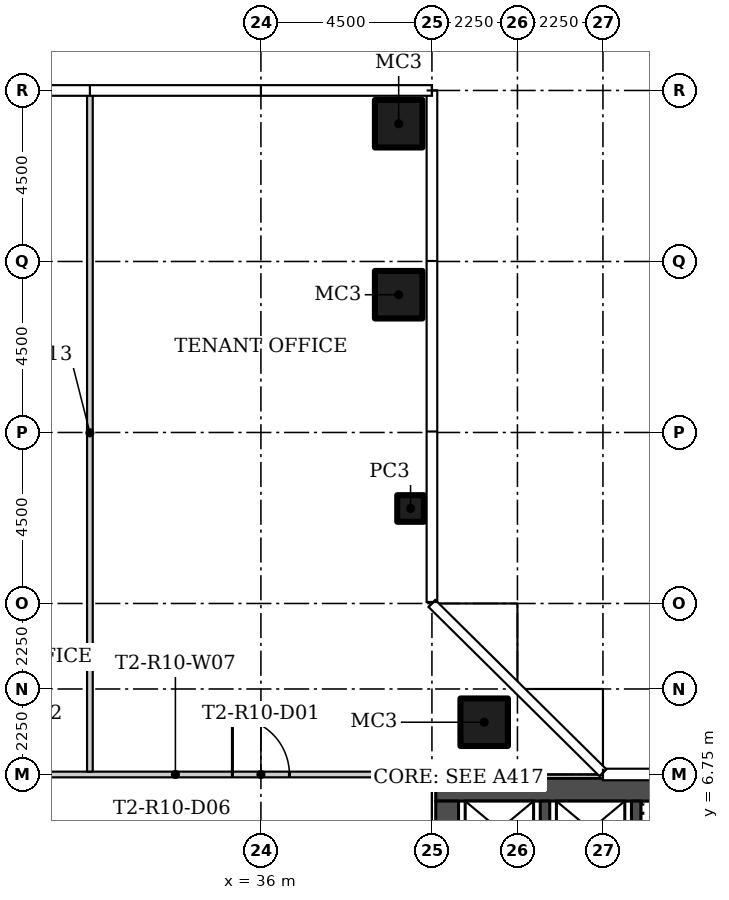
"""IFC4 building model, lengths in metres.
Left out: names, types, materials, properties, quantities, classifications, styles, units other than length and angle.
Written with IfcOpenShell. Run it as: python <this file> out.ifc"""

import sys

from ifc_helpers import new_model, si_unit, direction, frame, frame_2d, origin, origin_2d, place, context, subcontext, project, spatial, rectangle, hollow_rectangle, extrude, element, fill, save


model = new_model("IFC4")
c1 = context("Model", 3, precision=1e-05, world=origin(), true_north=direction((0.0, 1.0)))
c2 = subcontext(c1, "Body", "Model", "MODEL_VIEW")
j1 = project(units=[si_unit("LENGTHUNIT", "METRE"), si_unit("PLANEANGLEUNIT", "RADIAN")], contexts=[c1])
p1 = place(None, origin())
s1 = spatial("IfcSite", under=j1, at=p1, CompositionType="ELEMENT")
p2 = place(p1, origin())
s2 = spatial("IfcBuilding", under=s1, at=p2, CompositionType="ELEMENT")
p3 = place(p2, frame((0.0, 0.0, 101.4)))
s3 = spatial("IfcBuildingStorey", under=s2, at=p3, CompositionType="ELEMENT", Elevation=101.4)
p4 = place(p3, frame((41.875, 8.125, 0.0)))
e1 = element("IfcColumn", 1, at=p4, inside=s3, PredefinedType="COLUMN", context=c2, shape_type="SweptSolid", body=[
    extrude(hollow_rectangle(XDim=1.25, YDim=1.25, WallThickness=0.05, at=origin_2d()), origin(), (0.0, 0.0, 1.0), 3.55),
])
p5 = place(p3, frame((39.938, 13.75, 0.0)))
e2 = element("IfcColumn", 2, at=p5, inside=s3, PredefinedType="COLUMN", context=c2, shape_type="SweptSolid", body=[
    extrude(hollow_rectangle(XDim=0.7, YDim=0.7, WallThickness=0.025, at=origin_2d()), origin(), (0.0, 0.0, 1.0), 3.55),
])
for number, where in (
    (3, (39.625, 19.375, 0.0)),
    (4, (39.625, 23.875, 0.0)),
):
    element("IfcColumn", number, at=place(p3, frame(where)), inside=s3, PredefinedType="COLUMN", context=c2, shape_type="SweptSolid", body=[
        extrude(hollow_rectangle(XDim=1.25, YDim=1.25, WallThickness=0.05, at=origin_2d()), origin(), (0.0, 0.0, 1.0), 3.55),
    ])
p6 = place(p3, frame((26.9, 6.75, 0.0)))
e5 = element("IfcWall", 5, at=p6, inside=s3, PredefinedType="PARTITIONING", context=c2, shape_type="SweptSolid", body=[
    extrude(rectangle(XDim=13.7, YDim=0.15, at=frame_2d((6.85, 0.0))), origin(), (0.0, 0.0, 1.0), 3.55),
])
p7 = place(p6, frame((8.35, 0.0, 0.0)))
e6 = element("IfcOpeningElement", 6, at=p7, cuts=e5, PredefinedType="OPENING", context=c2, shape_type="SweptSolid", body=[
    extrude(rectangle(XDim=1.5, YDim=2.1, at=frame_2d((0.75, 1.05))), frame((0.0, 0.085, 0.0), z_axis=(0.0, -1.0, 0.0), x_axis=(1.0, 0.0, 0.0)), (0.0, 0.0, 1.0), 0.17),
])
p8 = place(p6, frame((1.6, 0.0, 0.0)))
e7 = element("IfcOpeningElement", 7, at=p8, cuts=e5, PredefinedType="OPENING", context=c2, shape_type="SweptSolid", body=[
    extrude(rectangle(XDim=1.5, YDim=2.1, at=frame_2d((0.75, 1.05))), frame((0.0, 0.085, 0.0), z_axis=(0.0, -1.0, 0.0), x_axis=(1.0, 0.0, 0.0)), (0.0, 0.0, 1.0), 0.17),
])
p9 = place(p3, frame((31.5, 24.655, 0.0), z_axis=(0.0, 0.0, 1.0), x_axis=(0.0, -1.0, 0.0)))
e8 = element("IfcWall", 8, at=p9, inside=s3, PredefinedType="PARTITIONING", context=c2, shape_type="SweptSolid", body=[
    extrude(rectangle(XDim=17.83, YDim=0.15, at=frame_2d((8.915, 0.0))), origin(), (0.0, 0.0, 1.0), 3.55),
])
p10 = place(p3, frame((53.9, 6.35, 0.0), z_axis=(0.0, 0.0, 1.0), x_axis=(-1.0, 0.0, 0.0)))
e9 = element("IfcWall", 9, at=p10, inside=s3, PredefinedType="SHEAR", context=c2, shape_type="SweptSolid", body=[
    extrude(rectangle(XDim=13.3, YDim=0.6, at=frame_2d((6.65, 0.0))), origin(), (0.0, 0.0, 1.0), 3.55),
])
p11 = place(p3, frame((40.9, -6.05, 0.0), z_axis=(0.0, 0.0, 1.0), x_axis=(0.0, 1.0, 0.0)))
e10 = element("IfcWall", 10, at=p11, inside=s3, PredefinedType="SHEAR", context=c2, shape_type="SweptSolid", body=[
    extrude(rectangle(XDim=12.1, YDim=0.6, at=frame_2d((6.05, 0.0))), origin(), (0.0, 0.0, 1.0), 3.55),
])
p12 = place(p11, frame((0.8, 0.0, 0.0)))
e11 = element("IfcOpeningElement", 11, at=p12, cuts=e10, PredefinedType="OPENING", context=c2, shape_type="SweptSolid", body=[
    extrude(rectangle(XDim=1.2, YDim=2.1, at=frame_2d((0.6, 1.05))), frame((0.0, 0.31, 0.0), z_axis=(0.0, -1.0, 0.0), x_axis=(1.0, 0.0, 0.0)), (0.0, 0.0, 1.0), 0.62),
])
p13 = place(p11, frame((6.4, 0.0, 0.0)))
e12 = element("IfcOpeningElement", 12, at=p13, cuts=e10, PredefinedType="OPENING", context=c2, shape_type="SweptSolid", body=[
    extrude(rectangle(XDim=1.8, YDim=2.4, at=frame_2d((0.9, 1.2))), frame((0.0, 0.31, 0.0), z_axis=(0.0, -1.0, 0.0), x_axis=(1.0, 0.0, 0.0)), (0.0, 0.0, 1.0), 0.62),
])
for number, where, z_axis, x_axis in (
    (13, (45.875, 3.25, 0.0), (0.0, 0.0, 1.0), (0.0, 1.0, 0.0)),
    (14, (43.475, 3.25, 0.0), (0.0, 0.0, 1.0), (0.0, 1.0, 0.0)),
):
    element("IfcWall", number, at=place(p3, frame(where, z_axis=z_axis, x_axis=x_axis)), inside=s3, PredefinedType="SHEAR", context=c2, shape_type="SweptSolid", body=[
        extrude(rectangle(XDim=2.8, YDim=0.25, at=frame_2d((1.4, 0.0))), origin(), (0.0, 0.0, 1.0), 3.55),
    ])
p14 = place(p7, origin())
e15 = element("IfcDoor", 15, at=p14, inside=s3, OperationType="DOUBLE_DOOR_SINGLE_SWING", PredefinedType="DOOR", context=c2, shape_type="SweptSolid", body=[
    extrude(rectangle(XDim=1.5, YDim=2.1, at=frame_2d((0.75, 1.05))), frame((0.0, 0.025, 0.0), z_axis=(0.0, -1.0, 0.0), x_axis=(1.0, 0.0, 0.0)), (0.0, 0.0, 1.0), 0.05),
])
fill(e6, e15)
save(model, sys.argv[1])
